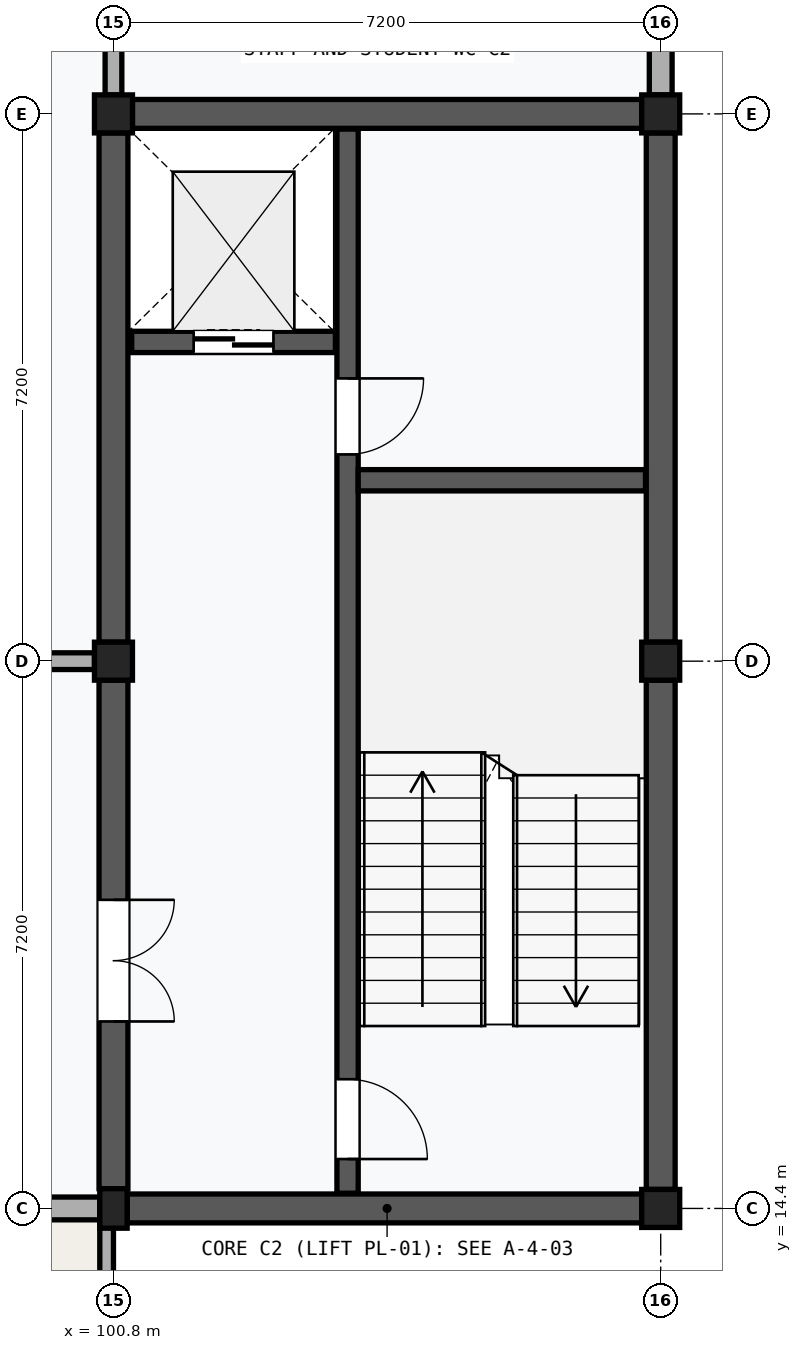
"""IFC4 building model, lengths in metres.
Left out: names, types, materials, properties, quantities, classifications, styles, units other than length and angle.
Written with IfcOpenShell. Run it as: python <this file> out.ifc"""

import sys

from ifc_helpers import new_model, si_unit, direction, frame, frame_2d, origin, origin_2d, place, context, subcontext, project, spatial, rectangle, extrude, element, fill, save


model = new_model("IFC4")
c1 = context("Model", 3, precision=1e-05, world=origin(), true_north=direction((0.0, 1.0)))
c2 = subcontext(c1, "Body", "Model", "MODEL_VIEW")
j1 = project(units=[si_unit("LENGTHUNIT", "METRE"), si_unit("PLANEANGLEUNIT", "RADIAN")], contexts=[c1])
p1 = place(None, origin())
s1 = spatial("IfcSite", under=j1, at=p1, CompositionType="ELEMENT")
p2 = place(p1, origin())
s2 = spatial("IfcBuilding", under=s1, at=p2, CompositionType="ELEMENT")
p3 = place(p2, frame((0.0, 0.0, 55.0)))
s3 = spatial("IfcBuildingStorey", under=s2, at=p3, CompositionType="ELEMENT", Elevation=55.0)
p4 = place(p3, frame((100.8, 14.4, 0.0), z_axis=(0.0, 0.0, 1.0), x_axis=(1.0, 0.0, 0.0)))
e1 = element("IfcColumn", 1, at=p4, inside=s3, PredefinedType="PILASTER", context=c2, shape_type="SweptSolid", body=[
    extrude(rectangle(XDim=0.36, YDim=0.52, at=origin_2d()), origin(), (0.0, 0.0, 1.0), 4.0),
])
for number, where, z_axis, x_axis in (
    (2, (100.8, 21.6, 0.0), (0.0, 0.0, 1.0), (1.0, 0.0, 0.0)),
    (3, (100.8, 28.8, 0.0), (0.0, 0.0, 1.0), (1.0, 0.0, 0.0)),
    (4, (108.0, 14.4, 0.0), (0.0, 0.0, 1.0), (1.0, 0.0, 0.0)),
    (5, (108.0, 21.6, 0.0), (0.0, 0.0, 1.0), (1.0, 0.0, 0.0)),
    (6, (108.0, 28.8, 0.0), (0.0, 0.0, 1.0), (1.0, 0.0, 0.0)),
):
    element("IfcColumn", number, at=place(p3, frame(where, z_axis=z_axis, x_axis=x_axis)), inside=s3, PredefinedType="COLUMN", context=c2, shape_type="SweptSolid", body=[
        extrude(rectangle(XDim=0.5, YDim=0.5, at=origin_2d()), origin(), (0.0, 0.0, 1.0), 4.0),
    ])
p5 = place(p3, frame((93.85, 14.4, 0.0), z_axis=(0.0, 0.0, 1.0), x_axis=(1.0, 0.0, 0.0)))
e7 = element("IfcWall", 7, at=p5, inside=s3, PredefinedType="SOLIDWALL", context=c2, shape_type="SweptSolid", body=[
    extrude(rectangle(XDim=6.77, YDim=0.3, at=frame_2d((3.385, 0.0))), origin(), (0.0, 0.0, 1.0), 3.17),
])
p6 = place(p5, frame((1.985, 0.0, 0.9)))
e8 = element("IfcOpeningElement", 8, at=p6, cuts=e7, PredefinedType="OPENING", context=c2, shape_type="SweptSolid", body=[
    extrude(rectangle(XDim=2.8, YDim=1.8, at=frame_2d((1.4, 0.9))), frame((0.0, 0.162, 0.0), z_axis=(0.0, -1.0, 0.0), x_axis=(1.0, 0.0, 0.0)), (0.0, 0.0, 1.0), 0.324),
])
p7 = place(p3, frame((108.0, 29.05, 0.0), z_axis=(0.0, 0.0, 1.0), x_axis=(0.0, 1.0, 0.0)))
e9 = element("IfcWall", 9, at=p7, inside=s3, PredefinedType="SOLIDWALL", context=c2, shape_type="SweptSolid", body=[
    extrude(rectangle(XDim=6.69, YDim=0.3, at=frame_2d((3.345, 0.0))), origin(), (0.0, 0.0, 1.0), 3.17),
])
p8 = place(p3, frame((100.71, 7.29, 0.0), z_axis=(0.0, 0.0, 1.0), x_axis=(0.0, 1.0, 0.0)))
e10 = element("IfcWall", 10, at=p8, inside=s3, PredefinedType="PARAPET", context=c2, shape_type="SweptSolid", body=[
    extrude(rectangle(XDim=7.02, YDim=0.18, at=frame_2d((3.51, 0.0))), origin(), (0.0, 0.0, 1.0), 0.95),
])
p9 = place(p3, frame((100.8, 14.66, 0.0), z_axis=(0.0, 0.0, 1.0), x_axis=(0.0, 1.0, 0.0)))
e11 = element("IfcWall", 11, at=p9, inside=s3, PredefinedType="SHEAR", context=c2, shape_type="SweptSolid", body=[
    extrude(rectangle(XDim=6.69, YDim=0.38, at=frame_2d((3.345, 0.0))), origin(), (0.0, 0.0, 1.0), 3.09),
])
p10 = place(p9, frame((2.2, 0.0, 0.0)))
e12 = element("IfcOpeningElement", 12, at=p10, cuts=e11, PredefinedType="OPENING", context=c2, shape_type="SweptSolid", body=[
    extrude(rectangle(XDim=1.6, YDim=2.2, at=frame_2d((0.8, 1.1))), frame((0.0, 0.202, 0.0), z_axis=(0.0, -1.0, 0.0), x_axis=(1.0, 0.0, 0.0)), (0.0, 0.0, 1.0), 0.404),
])
p11 = place(p3, frame((100.8, 21.85, 0.0), z_axis=(0.0, 0.0, 1.0), x_axis=(0.0, 1.0, 0.0)))
e13 = element("IfcWall", 13, at=p11, inside=s3, PredefinedType="SHEAR", context=c2, shape_type="SweptSolid", body=[
    extrude(rectangle(XDim=6.7, YDim=0.38, at=frame_2d((3.35, 0.0))), origin(), (0.0, 0.0, 1.0), 3.09),
])
p12 = place(p3, frame((108.0, 14.65, 0.0), z_axis=(0.0, 0.0, 1.0), x_axis=(0.0, 1.0, 0.0)))
e14 = element("IfcWall", 14, at=p12, inside=s3, PredefinedType="SHEAR", context=c2, shape_type="SweptSolid", body=[
    extrude(rectangle(XDim=6.7, YDim=0.38, at=frame_2d((3.35, 0.0))), origin(), (0.0, 0.0, 1.0), 3.17),
])
p13 = place(p3, frame((108.0, 21.85, 0.0), z_axis=(0.0, 0.0, 1.0), x_axis=(0.0, 1.0, 0.0)))
e15 = element("IfcWall", 15, at=p13, inside=s3, PredefinedType="SHEAR", context=c2, shape_type="SweptSolid", body=[
    extrude(rectangle(XDim=6.7, YDim=0.38, at=frame_2d((3.35, 0.0))), origin(), (0.0, 0.0, 1.0), 3.17),
])
p14 = place(p3, frame((100.98, 14.4, 0.0), z_axis=(0.0, 0.0, 1.0), x_axis=(1.0, 0.0, 0.0)))
e16 = element("IfcWall", 16, at=p14, inside=s3, PredefinedType="SHEAR", context=c2, shape_type="SweptSolid", body=[
    extrude(rectangle(XDim=6.77, YDim=0.38, at=frame_2d((3.385, 0.0))), origin(), (0.0, 0.0, 1.0), 3.17),
])
p15 = place(p3, frame((101.05, 28.8, 0.0), z_axis=(0.0, 0.0, 1.0), x_axis=(1.0, 0.0, 0.0)))
e17 = element("IfcWall", 17, at=p15, inside=s3, PredefinedType="SHEAR", context=c2, shape_type="SweptSolid", body=[
    extrude(rectangle(XDim=6.7, YDim=0.38, at=frame_2d((3.35, 0.0))), origin(), (0.0, 0.0, 1.0), 3.09),
])
p16 = place(p3, frame((103.88, 14.6, 0.0), z_axis=(0.0, 0.0, 1.0), x_axis=(0.0, 1.0, 0.0)))
e18 = element("IfcWall", 18, at=p16, inside=s3, PredefinedType="SHEAR", context=c2, shape_type="SweptSolid", body=[
    extrude(rectangle(XDim=14.0, YDim=0.28, at=frame_2d((7.0, 0.0))), origin(), (0.0, 0.0, 1.0), 3.77),
])
p17 = place(p16, frame((0.45, 0.0, 0.0)))
e19 = element("IfcOpeningElement", 19, at=p17, cuts=e18, PredefinedType="OPENING", context=c2, shape_type="SweptSolid", body=[
    extrude(rectangle(XDim=1.05, YDim=2.15, at=frame_2d((0.525, 1.075))), frame((0.0, 0.152, 0.0), z_axis=(0.0, -1.0, 0.0), x_axis=(1.0, 0.0, 0.0)), (0.0, 0.0, 1.0), 0.304),
])
p18 = place(p16, frame((9.72, 0.0, 0.0)))
e20 = element("IfcOpeningElement", 20, at=p18, cuts=e18, PredefinedType="OPENING", context=c2, shape_type="SweptSolid", body=[
    extrude(rectangle(XDim=1.0, YDim=2.15, at=frame_2d((0.5, 1.075))), frame((0.0, 0.152, 0.0), z_axis=(0.0, -1.0, 0.0), x_axis=(1.0, 0.0, 0.0)), (0.0, 0.0, 1.0), 0.304),
])
p19 = place(p3, frame((104.02, 23.98, 0.0), z_axis=(0.0, 0.0, 1.0), x_axis=(1.0, 0.0, 0.0)))
e21 = element("IfcWall", 21, at=p19, inside=s3, PredefinedType="SHEAR", context=c2, shape_type="SweptSolid", body=[
    extrude(rectangle(XDim=3.78, YDim=0.28, at=frame_2d((1.89, 0.0))), origin(), (0.0, 0.0, 1.0), 3.77),
])
p20 = place(p3, frame((101.04, 25.8, 0.0), z_axis=(0.0, 0.0, 1.0), x_axis=(1.0, 0.0, 0.0)))
e22 = element("IfcWall", 22, at=p20, inside=s3, PredefinedType="SHEAR", context=c2, shape_type="SweptSolid", body=[
    extrude(rectangle(XDim=2.68, YDim=0.28, at=frame_2d((1.34, 0.0))), origin(), (0.0, 0.0, 1.0), 3.77),
])
p21 = place(p20, frame((0.815, 0.0, 0.0)))
e23 = element("IfcOpeningElement", 23, at=p21, cuts=e22, PredefinedType="OPENING", context=c2, shape_type="SweptSolid", body=[
    extrude(rectangle(XDim=1.05, YDim=2.2, at=frame_2d((0.525, 1.1))), frame((0.0, 0.152, 0.0), z_axis=(0.0, -1.0, 0.0), x_axis=(1.0, 0.0, 0.0)), (0.0, 0.0, 1.0), 0.304),
])
p22 = place(p3, frame((93.85, 21.6, 0.0), z_axis=(0.0, 0.0, 1.0), x_axis=(1.0, 0.0, 0.0)))
e24 = element("IfcWall", 24, at=p22, inside=s3, PredefinedType="PARTITIONING", context=c2, shape_type="SweptSolid", body=[
    extrude(rectangle(XDim=6.7, YDim=0.22, at=frame_2d((3.35, 0.0))), origin(), (0.0, 0.0, 1.0), 3.09),
])
p23 = place(p22, frame((2.79, 0.0, 0.0)))
e25 = element("IfcOpeningElement", 25, at=p23, cuts=e24, PredefinedType="OPENING", context=c2, shape_type="SweptSolid", body=[
    extrude(rectangle(XDim=1.12, YDim=2.2, at=frame_2d((0.56, 1.1))), frame((0.0, 0.122, 0.0), z_axis=(0.0, -1.0, 0.0), x_axis=(1.0, 0.0, 0.0)), (0.0, 0.0, 1.0), 0.244),
])
p24 = place(p3, frame((100.8, 29.05, 0.0), z_axis=(0.0, 0.0, 1.0), x_axis=(0.0, 1.0, 0.0)))
e26 = element("IfcWall", 26, at=p24, inside=s3, PredefinedType="PARTITIONING", context=c2, shape_type="SweptSolid", body=[
    extrude(rectangle(XDim=6.7, YDim=0.22, at=frame_2d((3.35, 0.0))), origin(), (0.0, 0.0, 1.0), 3.09),
])
p25 = place(p10, frame((1.6, 0.0, 0.0), z_axis=(0.0, 0.0, 1.0), x_axis=(-1.0, 0.0, 0.0)))
e27 = element("IfcDoor", 27, at=p25, inside=s3, OperationType="DOUBLE_DOOR_SINGLE_SWING", PredefinedType="DOOR", context=c2, shape_type="SweptSolid", body=[
    extrude(rectangle(XDim=1.6, YDim=2.2, at=frame_2d((0.8, 1.1))), frame((0.0, 0.025, 0.0), z_axis=(0.0, -1.0, 0.0), x_axis=(1.0, 0.0, 0.0)), (0.0, 0.0, 1.0), 0.05),
])
fill(e12, e27)
p26 = place(p17, frame((1.05, 0.0, 0.0), z_axis=(0.0, 0.0, 1.0), x_axis=(-1.0, 0.0, 0.0)))
e28 = element("IfcDoor", 28, at=p26, inside=s3, OperationType="SINGLE_SWING_RIGHT", PredefinedType="DOOR", context=c2, shape_type="SweptSolid", body=[
    extrude(rectangle(XDim=1.05, YDim=2.15, at=frame_2d((0.525, 1.075))), frame((0.0, 0.025, 0.0), z_axis=(0.0, -1.0, 0.0), x_axis=(1.0, 0.0, 0.0)), (0.0, 0.0, 1.0), 0.05),
])
fill(e19, e28)
p27 = place(p18, frame((1.0, 0.0, 0.0), z_axis=(0.0, 0.0, 1.0), x_axis=(-1.0, 0.0, 0.0)))
e29 = element("IfcDoor", 29, at=p27, inside=s3, OperationType="SINGLE_SWING_LEFT", PredefinedType="DOOR", context=c2, shape_type="SweptSolid", body=[
    extrude(rectangle(XDim=1.0, YDim=2.15, at=frame_2d((0.5, 1.075))), frame((0.0, 0.025, 0.0), z_axis=(0.0, -1.0, 0.0), x_axis=(1.0, 0.0, 0.0)), (0.0, 0.0, 1.0), 0.05),
])
fill(e20, e29)
p28 = place(p21, frame((1.05, 0.0, 0.0), z_axis=(0.0, 0.0, 1.0), x_axis=(-1.0, 0.0, 0.0)))
e30 = element("IfcDoor", 30, at=p28, inside=s3, OperationType="DOUBLE_DOOR_SLIDING", PredefinedType="DOOR", context=c2, shape_type="SweptSolid", body=[
    extrude(rectangle(XDim=1.05, YDim=2.2, at=frame_2d((0.525, 1.1))), frame((0.0, 0.025, 0.0), z_axis=(0.0, -1.0, 0.0), x_axis=(1.0, 0.0, 0.0)), (0.0, 0.0, 1.0), 0.05),
])
fill(e23, e30)
save(model, sys.argv[1])
